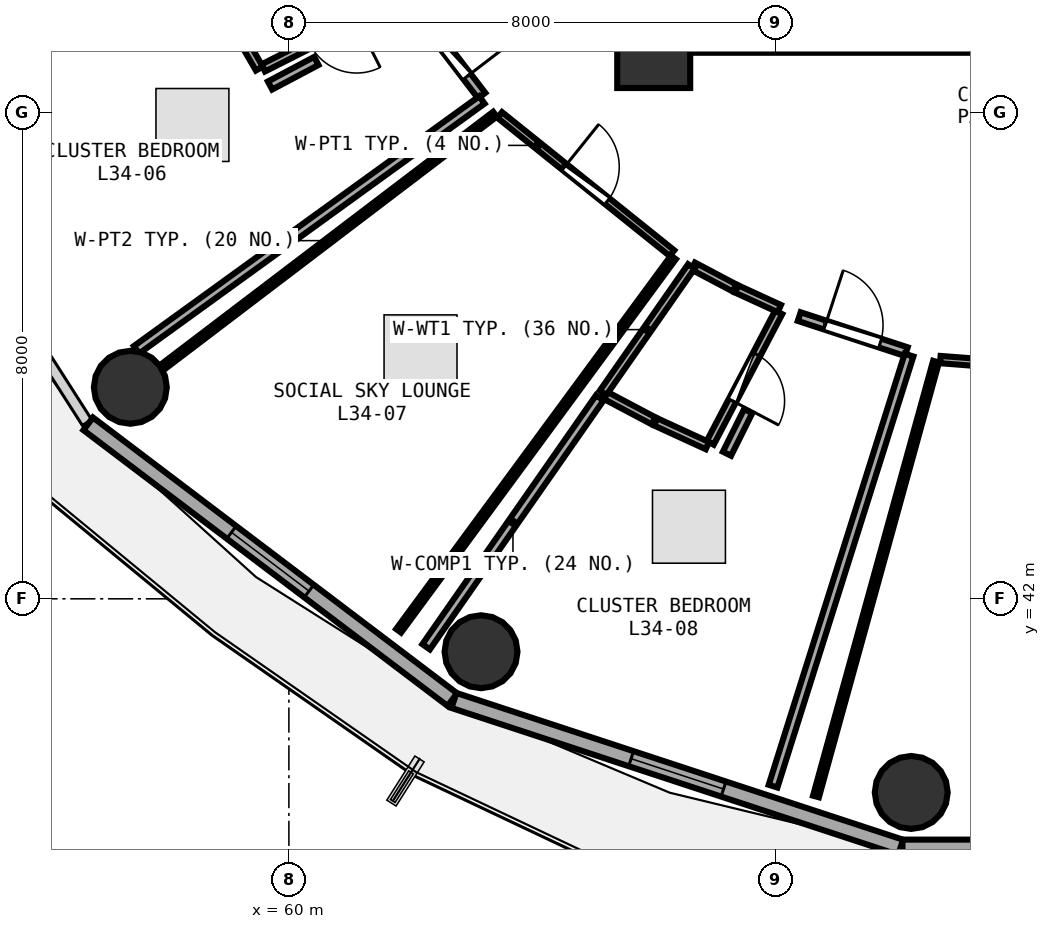
"""IFC4 building model, lengths in metres.
Left out: names, types, materials, properties, quantities, classifications, styles, units other than length and angle.
Written with IfcOpenShell. Run it as: python <this file> out.ifc"""

import sys

from ifc_helpers import new_model, si_unit, direction, frame, frame_2d, origin, origin_2d, place, context, subcontext, project, spatial, rectangle, circle, extrude, element, fill, save


model = new_model("IFC4")
c1 = context("Model", 3, precision=1e-05, world=origin(), true_north=direction((0.0, 1.0)))
c2 = subcontext(c1, "Body", "Model", "MODEL_VIEW")
j1 = project(units=[si_unit("LENGTHUNIT", "METRE"), si_unit("PLANEANGLEUNIT", "RADIAN")], contexts=[c1])
p1 = place(None, origin())
s1 = spatial("IfcSite", under=j1, at=p1, CompositionType="ELEMENT")
p2 = place(p1, origin())
s2 = spatial("IfcBuilding", under=s1, at=p2, CompositionType="ELEMENT")
p3 = place(p2, frame((0.0, 0.0, 135.6)))
s3 = spatial("IfcBuildingStorey", under=s2, at=p3, CompositionType="ELEMENT", Elevation=135.6)
p4 = place(p3, frame((66.0, 51.0, 0.0), z_axis=(0.0, 0.0, 1.0), x_axis=(1.0, 0.0, 0.0)))
e1 = element("IfcColumn", 1, at=p4, inside=s3, PredefinedType="PILASTER", context=c2, shape_type="SweptSolid", body=[
    extrude(rectangle(XDim=1.2, YDim=1.2, at=origin_2d()), origin(), (0.0, 0.0, 1.0), 3.75),
])
for number, where, z_axis, x_axis in (
    (2, (57.392, 45.479, 0.0), (0.0, 0.0, 1.0), (1.0, 0.0, 0.0)),
    (3, (63.16, 41.13, 0.0), (0.0, 0.0, 1.0), (1.0, 0.0, 0.0)),
    (4, (70.235, 38.816, 0.0), (0.0, 0.0, 1.0), (1.0, 0.0, 0.0)),
):
    element("IfcColumn", number, at=place(p3, frame(where, z_axis=z_axis, x_axis=x_axis)), inside=s3, PredefinedType="COLUMN", context=c2, shape_type="SweptSolid", body=[
        extrude(circle(Radius=0.6, at=origin_2d()), origin(), (0.0, 0.0, 1.0), 3.75),
    ])
p5 = place(p3, frame((56.699, 44.878, 0.0), z_axis=(0.0, 0.0, 1.0), x_axis=(0.797163719609, -0.603763202042, 0.0)))
e5 = element("IfcWall", 5, at=p5, inside=s3, PredefinedType="SOLIDWALL", context=c2, shape_type="SweptSolid", body=[
    extrude(rectangle(XDim=7.512, YDim=0.26, at=frame_2d((3.756, 0.0))), origin(), (0.0, 0.0, 1.0), 3.475),
])
p6 = place(p5, frame((2.956, 0.0, 0.85)))
e6 = element("IfcOpeningElement", 6, at=p6, cuts=e5, PredefinedType="OPENING", context=c2, shape_type="SweptSolid", body=[
    extrude(rectangle(XDim=1.6, YDim=1.45, at=frame_2d((0.8, 0.725))), frame((0.0, 0.14, 0.0), z_axis=(0.0, -1.0, 0.0), x_axis=(1.0, 0.0, 0.0)), (0.0, 0.0, 1.0), 0.28),
])
p7 = place(p3, frame((62.714, 40.328, 0.0), z_axis=(0.0, 0.0, 1.0), x_axis=(0.950038302428, -0.312133343173, 0.0)))
e7 = element("IfcWall", 7, at=p7, inside=s3, PredefinedType="SOLIDWALL", context=c2, shape_type="SweptSolid", body=[
    extrude(rectangle(XDim=7.733, YDim=0.26, at=frame_2d((3.867, 0.0))), origin(), (0.0, 0.0, 1.0), 3.475),
])
p8 = place(p7, frame((3.067, 0.0, 0.85)))
e8 = element("IfcOpeningElement", 8, at=p8, cuts=e7, PredefinedType="OPENING", context=c2, shape_type="SweptSolid", body=[
    extrude(rectangle(XDim=1.6, YDim=1.45, at=frame_2d((0.8, 0.725))), frame((0.0, 0.14, 0.0), z_axis=(0.0, -1.0, 0.0), x_axis=(1.0, 0.0, 0.0)), (0.0, 0.0, 1.0), 0.28),
])
p9 = place(p3, frame((70.091, 37.91, 0.0), z_axis=(0.0, 0.0, 1.0), x_axis=(1.0, 0.0, 0.0)))
e9 = element("IfcWall", 9, at=p9, inside=s3, PredefinedType="SOLIDWALL", context=c2, shape_type="SweptSolid", body=[
    extrude(rectangle(XDim=7.819, YDim=0.26, at=frame_2d((3.909, 0.0))), origin(), (0.0, 0.0, 1.0), 3.475),
])
p10 = place(p9, frame((3.434, 0.0, 0.0)))
e10 = element("IfcOpeningElement", 10, at=p10, cuts=e9, PredefinedType="OPENING", context=c2, shape_type="SweptSolid", body=[
    extrude(rectangle(XDim=0.95, YDim=2.1, at=frame_2d((0.475, 1.05))), frame((0.0, 0.14, 0.0), z_axis=(0.0, -1.0, 0.0), x_axis=(1.0, 0.0, 0.0)), (0.0, 0.0, 1.0), 0.28),
])
p11 = place(p9, frame((4.734, 0.0, 0.85)))
e11 = element("IfcOpeningElement", 11, at=p11, cuts=e9, PredefinedType="OPENING", context=c2, shape_type="SweptSolid", body=[
    extrude(rectangle(XDim=1.2, YDim=1.45, at=frame_2d((0.6, 0.725))), frame((0.0, 0.14, 0.0), z_axis=(0.0, -1.0, 0.0), x_axis=(1.0, 0.0, 0.0)), (0.0, 0.0, 1.0), 0.28),
])
p12 = place(p3, frame((66.26, 51.08, 0.0), z_axis=(0.0, 0.0, 1.0), x_axis=(1.0, 0.0, 0.0)))
e12 = element("IfcWall", 12, at=p12, inside=s3, PredefinedType="SHEAR", context=c2, shape_type="SweptSolid", body=[
    extrude(rectangle(XDim=7.16, YDim=0.2, at=frame_2d((3.58, 0.0))), origin(), (0.0, 0.0, 1.0), 3.49),
])
p13 = place(p3, frame((70.714, 45.934, 0.0), z_axis=(0.0, 0.0, 1.0), x_axis=(0.99702766625, -0.077044355613, 0.0)))
e13 = element("IfcWall", 13, at=p13, inside=s3, PredefinedType="PARTITIONING", context=c2, shape_type="SweptSolid", body=[
    extrude(rectangle(XDim=4.24, YDim=0.12, at=frame_2d((2.12, 0.0))), origin(), (0.0, 0.0, 1.0), 2.975),
])
p14 = place(p13, frame((1.67, 0.0, 0.0)))
e14 = element("IfcOpeningElement", 14, at=p14, cuts=e13, PredefinedType="OPENING", context=c2, shape_type="SweptSolid", body=[
    extrude(rectangle(XDim=0.9, YDim=2.08, at=frame_2d((0.45, 1.04))), frame((0.0, 0.07, 0.0), z_axis=(0.0, -1.0, 0.0), x_axis=(1.0, 0.0, 0.0)), (0.0, 0.0, 1.0), 0.14),
])
p15 = place(p3, frame((61.883, 51.895, 0.0), z_axis=(0.0, 0.0, 1.0), x_axis=(-0.892490597906, -0.451065995891, 0.0)))
e15 = element("IfcWall", 15, at=p15, inside=s3, PredefinedType="PLUMBINGWALL", context=c2, shape_type="SweptSolid", body=[
    extrude(rectangle(XDim=2.583, YDim=0.13, at=frame_2d((1.292, 0.0))), origin(), (0.0, 0.0, 1.0), 2.975),
])
p16 = place(p15, frame((0.861, 0.0, 0.0)))
e16 = element("IfcOpeningElement", 16, at=p16, cuts=e15, PredefinedType="OPENING", context=c2, shape_type="SweptSolid", body=[
    extrude(rectangle(XDim=0.86, YDim=2.05, at=frame_2d((0.43, 1.025))), frame((0.0, 0.075, 0.0), z_axis=(0.0, -1.0, 0.0), x_axis=(1.0, 0.0, 0.0)), (0.0, 0.0, 1.0), 0.15),
])
p17 = place(p3, frame((62.111, 51.658, 0.0), z_axis=(0.0, 0.0, 1.0), x_axis=(0.608307977949, -0.793701079729, 0.0)))
e17 = element("IfcWall", 17, at=p17, inside=s3, PredefinedType="PARTITIONING", context=c2, shape_type="SweptSolid", body=[
    extrude(rectangle(XDim=1.742, YDim=0.15, at=frame_2d((0.871, 0.0))), origin(), (0.0, 0.0, 1.0), 2.975),
])
p18 = place(p17, frame((0.396, 0.0, 0.0)))
e18 = element("IfcOpeningElement", 18, at=p18, cuts=e17, PredefinedType="OPENING", context=c2, shape_type="SweptSolid", body=[
    extrude(rectangle(XDim=0.95, YDim=2.08, at=frame_2d((0.475, 1.04))), frame((0.0, 0.085, 0.0), z_axis=(0.0, -1.0, 0.0), x_axis=(1.0, 0.0, 0.0)), (0.0, 0.0, 1.0), 0.17),
])
p19 = place(p3, frame((63.468, 49.957, 0.0), z_axis=(0.0, 0.0, 1.0), x_axis=(0.78006790059, -0.625694870099, 0.0)))
e19 = element("IfcWall", 19, at=p19, inside=s3, PredefinedType="PARTITIONING", context=c2, shape_type="SweptSolid", body=[
    extrude(rectangle(XDim=3.631, YDim=0.12, at=frame_2d((1.815, 0.0))), origin(), (0.0, 0.0, 1.0), 2.975),
])
p20 = place(p19, frame((1.366, 0.0, 0.0)))
e20 = element("IfcOpeningElement", 20, at=p20, cuts=e19, PredefinedType="OPENING", context=c2, shape_type="SweptSolid", body=[
    extrude(rectangle(XDim=0.9, YDim=2.08, at=frame_2d((0.45, 1.04))), frame((0.0, 0.07, 0.0), z_axis=(0.0, -1.0, 0.0), x_axis=(1.0, 0.0, 0.0)), (0.0, 0.0, 1.0), 0.14),
])
p21 = place(p3, frame((68.056, 46.712, 0.0), z_axis=(0.0, 0.0, 1.0), x_axis=(-0.464721454244, -0.885456927222, 0.0)))
e21 = element("IfcWall", 21, at=p21, inside=s3, PredefinedType="PLUMBINGWALL", context=c2, shape_type="SweptSolid", body=[
    extrude(rectangle(XDim=2.426, YDim=0.13, at=frame_2d((1.213, 0.0))), origin(), (0.0, 0.0, 1.0), 3.175),
])
p22 = place(p21, frame((0.783, 0.0, 0.0)))
e22 = element("IfcOpeningElement", 22, at=p22, cuts=e21, PredefinedType="OPENING", context=c2, shape_type="SweptSolid", body=[
    extrude(rectangle(XDim=0.86, YDim=2.05, at=frame_2d((0.43, 1.025))), frame((0.0, 0.075, 0.0), z_axis=(0.0, -1.0, 0.0), x_axis=(1.0, 0.0, 0.0)), (0.0, 0.0, 1.0), 0.15),
])
p23 = place(p3, frame((68.393, 46.641, 0.0), z_axis=(0.0, 0.0, 1.0), x_axis=(0.950343295829, -0.311203502668, 0.0)))
e23 = element("IfcWall", 23, at=p23, inside=s3, PredefinedType="PARTITIONING", context=c2, shape_type="SweptSolid", body=[
    extrude(rectangle(XDim=1.853, YDim=0.15, at=frame_2d((0.927, 0.0))), origin(), (0.0, 0.0, 1.0), 3.48),
])
p24 = place(p23, frame((0.451, 0.0, 0.0)))
e24 = element("IfcOpeningElement", 24, at=p24, cuts=e23, PredefinedType="OPENING", context=c2, shape_type="SweptSolid", body=[
    extrude(rectangle(XDim=0.95, YDim=2.08, at=frame_2d((0.475, 1.04))), frame((0.0, 0.085, 0.0), z_axis=(0.0, -1.0, 0.0), x_axis=(1.0, 0.0, 0.0)), (0.0, 0.0, 1.0), 0.17),
])
p25 = place(p3, frame((68.669, 38.75, 0.0), z_axis=(0.0, 0.0, 1.0), x_axis=(0.26617364863, 0.963925095002, 0.0)))
e25 = element("IfcWall", 25, at=p25, inside=s3, PredefinedType="PARTITIONING", context=c2, shape_type="SweptSolid", body=[
    extrude(rectangle(XDim=7.418, YDim=0.1, at=frame_2d((3.709, 0.0))), origin(), (0.0, 0.0, 1.0), 3.025),
])
p26 = place(p3, frame((59.514, 50.72, 0.0), z_axis=(0.0, 0.0, 1.0), x_axis=(-0.501222652689, 0.865318353227, 0.0)))
e26 = element("IfcWall", 26, at=p26, inside=s3, PredefinedType="PLUMBINGWALL", context=c2, shape_type="SweptSolid", body=[
    extrude(rectangle(XDim=0.878, YDim=0.13, at=frame_2d((0.439, 0.0))), origin(), (0.0, 0.0, 1.0), 2.975),
])
p27 = place(p3, frame((63.175, 50.205, 0.0), z_axis=(0.0, 0.0, 1.0), x_axis=(-0.810227225477, -0.586115895618, 0.0)))
e27 = element("IfcWall", 27, at=p27, inside=s3, PredefinedType="PARTITIONING", context=c2, shape_type="SweptSolid", body=[
    extrude(rectangle(XDim=7.011, YDim=0.15, at=frame_2d((3.506, 0.0))), origin(), (0.0, 0.0, 1.0), 3.175),
])
p28 = place(p3, frame((53.624, 50.438, 0.0), z_axis=(0.0, 0.0, 1.0), x_axis=(0.937175901168, 0.348857177468, 0.0)))
e28 = element("IfcWall", 28, at=p28, inside=s3, PredefinedType="PARTITIONING", context=c2, shape_type="SweptSolid", body=[
    extrude(rectangle(XDim=5.292, YDim=0.15, at=frame_2d((2.646, 0.0))), origin(), (0.0, 0.0, 1.0), 2.975),
])
p29 = place(p3, frame((59.69, 50.442, 0.0), z_axis=(0.0, 0.0, 1.0), x_axis=(0.883456769574, 0.468512685308, 0.0)))
e29 = element("IfcWall", 29, at=p29, inside=s3, PredefinedType="PARTITIONING", context=c2, shape_type="SweptSolid", body=[
    extrude(rectangle(XDim=0.861, YDim=0.15, at=frame_2d((0.431, 0.0))), origin(), (0.0, 0.0, 1.0), 3.48),
])
p30 = place(p3, frame((66.323, 47.615, 0.0), z_axis=(0.0, 0.0, 1.0), x_axis=(-0.592678959784, -0.805438793845, 0.0)))
e30 = element("IfcWall", 30, at=p30, inside=s3, PredefinedType="PARTITIONING", context=c2, shape_type="SweptSolid", body=[
    extrude(rectangle(XDim=7.624, YDim=0.1, at=frame_2d((3.812, 0.0))), origin(), (0.0, 0.0, 1.0), 2.975),
])
p31 = place(p3, frame((57.921, 45.811, 0.0), z_axis=(0.0, 0.0, 1.0), x_axis=(0.79595600815, 0.60535446896, 0.0)))
e31 = element("IfcWall", 31, at=p31, inside=s3, PredefinedType="PARTITIONING", context=c2, shape_type="SweptSolid", body=[
    extrude(rectangle(XDim=6.869, YDim=0.1, at=frame_2d((3.435, 0.0))), origin(), (0.0, 0.0, 1.0), 2.975),
])
p32 = place(p3, frame((66.648, 47.473, 0.0), z_axis=(0.0, 0.0, 1.0), x_axis=(0.884034960309, -0.467420783611, 0.0)))
e32 = element("IfcWall", 32, at=p32, inside=s3, PredefinedType="PLUMBINGWALL", context=c2, shape_type="SweptSolid", body=[
    extrude(rectangle(XDim=0.769, YDim=0.13, at=frame_2d((0.384, 0.0))), origin(), (0.0, 0.0, 1.0), 3.235),
])
p33 = place(p3, frame((67.363, 47.096, 0.0), z_axis=(0.0, 0.0, 1.0), x_axis=(0.908835433781, -0.417154832531, 0.0)))
e33 = element("IfcWall", 33, at=p33, inside=s3, PredefinedType="PLUMBINGWALL", context=c2, shape_type="SweptSolid", body=[
    extrude(rectangle(XDim=0.773, YDim=0.13, at=frame_2d((0.387, 0.0))), origin(), (0.0, 0.0, 1.0), 3.235),
])
p34 = place(p3, frame((66.883, 44.519, 0.0), z_axis=(0.0, 0.0, 1.0), x_axis=(-0.90885062215, 0.417121740763, 0.0)))
e34 = element("IfcWall", 34, at=p34, inside=s3, PredefinedType="PLUMBINGWALL", context=c2, shape_type="SweptSolid", body=[
    extrude(rectangle(XDim=0.936, YDim=0.13, at=frame_2d((0.468, 0.0))), origin(), (0.0, 0.0, 1.0), 3.175),
])
p35 = place(p3, frame((65.996, 44.927, 0.0), z_axis=(0.0, 0.0, 1.0), x_axis=(-0.88373041627, 0.46799631554, 0.0)))
e35 = element("IfcWall", 35, at=p35, inside=s3, PredefinedType="PLUMBINGWALL", context=c2, shape_type="SweptSolid", body=[
    extrude(rectangle(XDim=0.93, YDim=0.13, at=frame_2d((0.465, 0.0))), origin(), (0.0, 0.0, 1.0), 3.175),
])
p36 = place(p3, frame((65.168, 45.388, 0.0), z_axis=(0.0, 0.0, 1.0), x_axis=(0.572452908282, 0.819937599943, 0.0)))
e36 = element("IfcWall", 36, at=p36, inside=s3, PredefinedType="PLUMBINGWALL", context=c2, shape_type="SweptSolid", body=[
    extrude(rectangle(XDim=2.533, YDim=0.13, at=frame_2d((1.267, 0.0))), origin(), (0.0, 0.0, 1.0), 3.235),
])
p37 = place(p3, frame((70.199, 46.008, 0.0), z_axis=(0.0, 0.0, 1.0), x_axis=(-0.300834252316, -0.953676440222, 0.0)))
e37 = element("IfcWall", 37, at=p37, inside=s3, PredefinedType="PARTITIONING", context=c2, shape_type="SweptSolid", body=[
    extrude(rectangle(XDim=7.433, YDim=0.15, at=frame_2d((3.716, 0.0))), origin(), (0.0, 0.0, 1.0), 3.025),
])
p38 = place(p3, frame((62.257, 41.211, 0.0), z_axis=(0.0, 0.0, 1.0), x_axis=(0.572125752908, 0.820165911789, 0.0)))
e38 = element("IfcWall", 38, at=p38, inside=s3, PredefinedType="PARTITIONING", context=c2, shape_type="SweptSolid", body=[
    extrude(rectangle(XDim=4.992, YDim=0.15, at=frame_2d((2.496, 0.0))), origin(), (0.0, 0.0, 1.0), 2.975),
])
p39 = place(p3, frame((67.205, 44.386, 0.0), z_axis=(0.0, 0.0, 1.0), x_axis=(0.445215718224, 0.89542334359, 0.0)))
e39 = element("IfcWall", 39, at=p39, inside=s3, PredefinedType="PARTITIONING", context=c2, shape_type="SweptSolid", body=[
    extrude(rectangle(XDim=0.782, YDim=0.15, at=frame_2d((0.391, 0.0))), origin(), (0.0, 0.0, 1.0), 3.175),
])
p40 = place(p6, origin())
e40 = element("IfcWindow", 40, at=p40, inside=s3, PartitioningType="SINGLE_PANEL", PredefinedType="WINDOW", context=c2, shape_type="SweptSolid", body=[
    extrude(rectangle(XDim=1.6, YDim=1.45, at=frame_2d((0.8, 0.725))), frame((0.0, 0.03, 0.0), z_axis=(0.0, -1.0, 0.0), x_axis=(1.0, 0.0, 0.0)), (0.0, 0.0, 1.0), 0.06),
])
fill(e6, e40)
p41 = place(p8, origin())
e41 = element("IfcWindow", 41, at=p41, inside=s3, PartitioningType="SINGLE_PANEL", PredefinedType="WINDOW", context=c2, shape_type="SweptSolid", body=[
    extrude(rectangle(XDim=1.6, YDim=1.45, at=frame_2d((0.8, 0.725))), frame((0.0, 0.03, 0.0), z_axis=(0.0, -1.0, 0.0), x_axis=(1.0, 0.0, 0.0)), (0.0, 0.0, 1.0), 0.06),
])
fill(e8, e41)
p42 = place(p18, origin())
e42 = element("IfcDoor", 42, at=p42, inside=s3, OperationType="SINGLE_SWING_RIGHT", PredefinedType="DOOR", context=c2, shape_type="SweptSolid", body=[
    extrude(rectangle(XDim=0.95, YDim=2.08, at=frame_2d((0.475, 1.04))), frame((0.0, 0.025, 0.0), z_axis=(0.0, -1.0, 0.0), x_axis=(1.0, 0.0, 0.0)), (0.0, 0.0, 1.0), 0.05),
])
fill(e18, e42)
p43 = place(p20, origin())
e43 = element("IfcDoor", 43, at=p43, inside=s3, OperationType="SINGLE_SWING_LEFT", PredefinedType="DOOR", context=c2, shape_type="SweptSolid", body=[
    extrude(rectangle(XDim=0.9, YDim=2.08, at=frame_2d((0.45, 1.04))), frame((0.0, 0.025, 0.0), z_axis=(0.0, -1.0, 0.0), x_axis=(1.0, 0.0, 0.0)), (0.0, 0.0, 1.0), 0.05),
])
fill(e20, e43)
p44 = place(p22, origin())
e44 = element("IfcDoor", 44, at=p44, inside=s3, OperationType="SINGLE_SWING_RIGHT", PredefinedType="DOOR", context=c2, shape_type="SweptSolid", body=[
    extrude(rectangle(XDim=0.86, YDim=2.05, at=frame_2d((0.43, 1.025))), frame((0.0, 0.025, 0.0), z_axis=(0.0, -1.0, 0.0), x_axis=(1.0, 0.0, 0.0)), (0.0, 0.0, 1.0), 0.05),
])
fill(e22, e44)
p45 = place(p24, origin())
e45 = element("IfcDoor", 45, at=p45, inside=s3, OperationType="SINGLE_SWING_LEFT", PredefinedType="DOOR", context=c2, shape_type="SweptSolid", body=[
    extrude(rectangle(XDim=0.95, YDim=2.08, at=frame_2d((0.475, 1.04))), frame((0.0, 0.025, 0.0), z_axis=(0.0, -1.0, 0.0), x_axis=(1.0, 0.0, 0.0)), (0.0, 0.0, 1.0), 0.05),
])
fill(e24, e45)
save(model, sys.argv[1])
